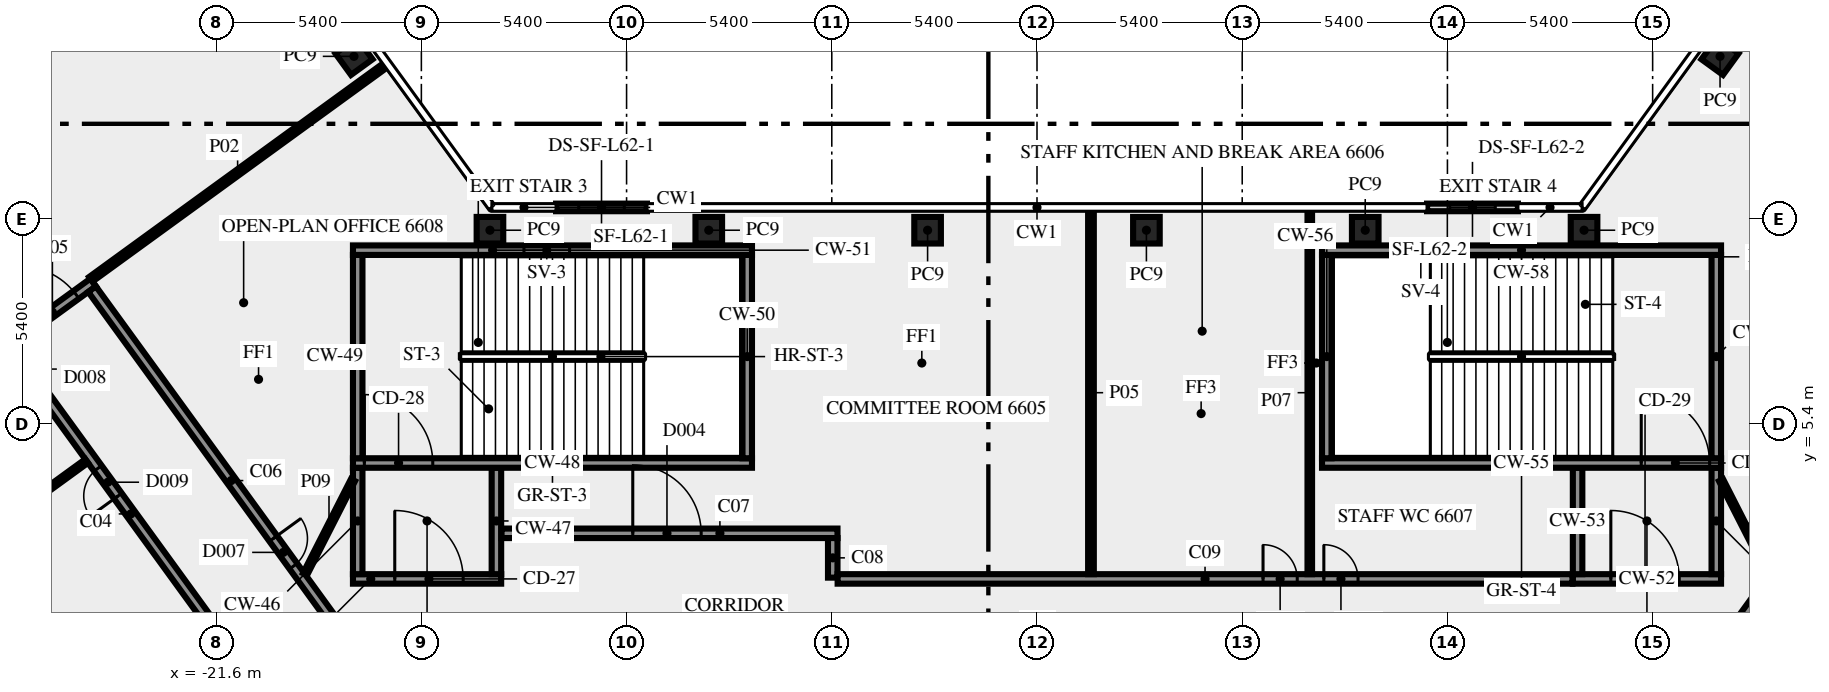
"""IFC4 building model, lengths in metres.
Left out: names, types, materials, properties, quantities, classifications, styles, units other than length and angle.
Written with IfcOpenShell. Run it as: python <this file> out.ifc"""

import sys

from ifc_helpers import new_model, si_unit, direction, frame, frame_2d, origin, origin_2d, place, context, subcontext, project, spatial, rectangle, extrude, element, fill, save


model = new_model("IFC4")
c1 = context("Model", 3, precision=1e-05, world=origin(), true_north=direction((0.0, 1.0)))
c2 = subcontext(c1, "Body", "Model", "MODEL_VIEW")
j1 = project(units=[si_unit("LENGTHUNIT", "METRE"), si_unit("PLANEANGLEUNIT", "RADIAN")], contexts=[c1])
p1 = place(None, origin())
s1 = spatial("IfcSite", under=j1, at=p1, CompositionType="ELEMENT")
p2 = place(p1, origin())
s2 = spatial("IfcBuilding", under=s1, at=p2, CompositionType="ELEMENT")
p3 = place(p2, frame((0.0, 0.0, 285.0)))
s3 = spatial("IfcBuildingStorey", under=s2, at=p3, CompositionType="ELEMENT", Elevation=285.0)
for number, where, z_axis, x_axis in (
    (1, (-17.974, 15.075, 0.0), (0.0, 0.0, 1.0), (-0.588, 0.809, 0.0)),
    (2, (17.974, 15.075, 0.0), (0.0, 0.0, 1.0), (-0.588, -0.809, 0.0)),
    (3, (14.395, 10.5, 0.0), (0.0, 0.0, 1.0), (-1.0, 0.0, 0.0)),
    (4, (8.637, 10.5, 0.0), (0.0, 0.0, 1.0), (-1.0, 0.0, 0.0)),
    (5, (2.879, 10.5, 0.0), (0.0, 0.0, 1.0), (-1.0, 0.0, 0.0)),
    (6, (-2.879, 10.5, 0.0), (0.0, 0.0, 1.0), (-1.0, 0.0, 0.0)),
    (7, (-8.637, 10.5, 0.0), (0.0, 0.0, 1.0), (-1.0, 0.0, 0.0)),
    (8, (-14.395, 10.5, 0.0), (0.0, 0.0, 1.0), (-1.0, 0.0, 0.0)),
):
    element("IfcColumn", number, at=place(p3, frame(where, z_axis=z_axis, x_axis=x_axis)), inside=s3, PredefinedType="COLUMN", context=c2, shape_type="SweptSolid", body=[
        extrude(rectangle(XDim=0.7, YDim=0.7, at=origin_2d()), origin(), (0.0, 0.0, 1.0), 3.65),
    ])
p4 = place(p3, frame((12.655, 11.1, 0.0), z_axis=(0.0, 0.0, 1.0), x_axis=(-1.0, 0.0, 0.0)))
e9 = element("IfcWall", 9, at=p4, inside=s3, PredefinedType="SOLIDWALL", context=c2, shape_type="SweptSolid", body=[
    extrude(rectangle(XDim=2.392, YDim=0.2, at=frame_2d((1.196, 0.0))), origin(), (0.0, 0.0, 1.0), 3.65),
])
p5 = place(p4, frame((0.596, 0.0, 1.0)))
e10 = element("IfcOpeningElement", 10, at=p5, cuts=e9, PredefinedType="OPENING", context=c2, shape_type="SweptSolid", body=[
    extrude(rectangle(XDim=1.2, YDim=1.2, at=frame_2d((0.6, 0.6))), frame((0.0, 0.11, 0.0), z_axis=(0.0, -1.0, 0.0), x_axis=(1.0, 0.0, 0.0)), (0.0, 0.0, 1.0), 0.22),
])
p6 = place(p3, frame((-10.263, 11.1, 0.0), z_axis=(0.0, 0.0, 1.0), x_axis=(-1.0, 0.0, 0.0)))
e11 = element("IfcWall", 11, at=p6, inside=s3, PredefinedType="SOLIDWALL", context=c2, shape_type="SweptSolid", body=[
    extrude(rectangle(XDim=2.392, YDim=0.2, at=frame_2d((1.196, 0.0))), origin(), (0.0, 0.0, 1.0), 3.65),
])
p7 = place(p6, frame((0.596, 0.0, 1.0)))
e12 = element("IfcOpeningElement", 12, at=p7, cuts=e11, PredefinedType="OPENING", context=c2, shape_type="SweptSolid", body=[
    extrude(rectangle(XDim=1.2, YDim=1.2, at=frame_2d((0.6, 0.6))), frame((0.0, 0.11, 0.0), z_axis=(0.0, -1.0, 0.0), x_axis=(1.0, 0.0, 0.0)), (0.0, 0.0, 1.0), 0.22),
])
p8 = place(p3, frame((-18.0, 1.325, 0.0), z_axis=(0.0, 0.0, 1.0), x_axis=(1.0, 0.0, 0.0)))
e13 = element("IfcWall", 13, at=p8, inside=s3, PredefinedType="SHEAR", context=c2, shape_type="SweptSolid", body=[
    extrude(rectangle(XDim=3.9, YDim=0.25, at=frame_2d((1.95, 0.0))), origin(), (0.0, 0.0, 1.0), 3.65),
])
p9 = place(p8, frame((1.1, 0.0, 0.0)))
e14 = element("IfcOpeningElement", 14, at=p9, cuts=e13, PredefinedType="OPENING", context=c2, shape_type="SweptSolid", body=[
    extrude(rectangle(XDim=1.8, YDim=2.1, at=frame_2d((0.9, 1.05))), frame((0.0, 0.135, 0.0), z_axis=(0.0, -1.0, 0.0), x_axis=(1.0, 0.0, 0.0)), (0.0, 0.0, 1.0), 0.27),
])
for number, where, z_axis, x_axis in (
    (15, (-17.875, 1.45, 0.0), (0.0, 0.0, 1.0), (0.0, 1.0, 0.0)),
    (16, (-14.225, 1.45, 0.0), (0.0, 0.0, 1.0), (0.0, 1.0, 0.0)),
):
    element("IfcWall", number, at=place(p3, frame(where, z_axis=z_axis, x_axis=x_axis)), inside=s3, PredefinedType="SHEAR", context=c2, shape_type="SweptSolid", body=[
        extrude(rectangle(XDim=2.8, YDim=0.25, at=frame_2d((1.4, 0.0))), origin(), (0.0, 0.0, 1.0), 3.65),
    ])
p10 = place(p3, frame((-18.0, 4.375, 0.0), z_axis=(0.0, 0.0, 1.0), x_axis=(1.0, 0.0, 0.0)))
e17 = element("IfcWall", 17, at=p10, inside=s3, PredefinedType="SHEAR", context=c2, shape_type="SweptSolid", body=[
    extrude(rectangle(XDim=10.5, YDim=0.25, at=frame_2d((5.25, 0.0))), origin(), (0.0, 0.0, 1.0), 3.65),
])
p11 = place(p10, frame((0.3, 0.0, 0.0)))
e18 = element("IfcOpeningElement", 18, at=p11, cuts=e17, PredefinedType="OPENING", context=c2, shape_type="SweptSolid", body=[
    extrude(rectangle(XDim=1.8, YDim=2.1, at=frame_2d((0.9, 1.05))), frame((0.0, 0.135, 0.0), z_axis=(0.0, -1.0, 0.0), x_axis=(1.0, 0.0, 0.0)), (0.0, 0.0, 1.0), 0.27),
])
for number, where, z_axis, x_axis in (
    (19, (-17.875, 4.5, 0.0), (0.0, 0.0, 1.0), (0.0, 1.0, 0.0)),
    (20, (-7.625, 4.5, 0.0), (0.0, 0.0, 1.0), (0.0, 1.0, 0.0)),
):
    element("IfcWall", number, at=place(p3, frame(where, z_axis=z_axis, x_axis=x_axis)), inside=s3, PredefinedType="SHEAR", context=c2, shape_type="SweptSolid", body=[
        extrude(rectangle(XDim=5.35, YDim=0.25, at=frame_2d((2.675, 0.0))), origin(), (0.0, 0.0, 1.0), 3.65),
    ])
p12 = place(p3, frame((-18.0, 9.975, 0.0), z_axis=(0.0, 0.0, 1.0), x_axis=(1.0, 0.0, 0.0)))
e21 = element("IfcWall", 21, at=p12, inside=s3, PredefinedType="SHEAR", context=c2, shape_type="SweptSolid", body=[
    extrude(rectangle(XDim=10.5, YDim=0.25, at=frame_2d((5.25, 0.0))), origin(), (0.0, 0.0, 1.0), 3.65),
])
p13 = place(p12, frame((4.5, 0.0, 1.0)))
e22 = element("IfcOpeningElement", 22, at=p13, cuts=e21, PredefinedType="OPENING", context=c2, shape_type="SweptSolid", body=[
    extrude(rectangle(XDim=1.2, YDim=1.2, at=frame_2d((0.6, 0.6))), frame((0.0, 0.135, 0.0), z_axis=(0.0, -1.0, 0.0), x_axis=(1.0, 0.0, 0.0)), (0.0, 0.0, 1.0), 0.27),
])
p14 = place(p3, frame((14.1, 1.325, 0.0), z_axis=(0.0, 0.0, 1.0), x_axis=(1.0, 0.0, 0.0)))
e23 = element("IfcWall", 23, at=p14, inside=s3, PredefinedType="SHEAR", context=c2, shape_type="SweptSolid", body=[
    extrude(rectangle(XDim=3.9, YDim=0.25, at=frame_2d((1.95, 0.0))), origin(), (0.0, 0.0, 1.0), 3.65),
])
p15 = place(p14, frame((1.0, 0.0, 0.0)))
e24 = element("IfcOpeningElement", 24, at=p15, cuts=e23, PredefinedType="OPENING", context=c2, shape_type="SweptSolid", body=[
    extrude(rectangle(XDim=1.8, YDim=2.1, at=frame_2d((0.9, 1.05))), frame((0.0, 0.135, 0.0), z_axis=(0.0, -1.0, 0.0), x_axis=(1.0, 0.0, 0.0)), (0.0, 0.0, 1.0), 0.27),
])
for number, where, z_axis, x_axis in (
    (25, (14.225, 1.45, 0.0), (0.0, 0.0, 1.0), (0.0, 1.0, 0.0)),
    (26, (17.875, 1.45, 0.0), (0.0, 0.0, 1.0), (0.0, 1.0, 0.0)),
):
    element("IfcWall", number, at=place(p3, frame(where, z_axis=z_axis, x_axis=x_axis)), inside=s3, PredefinedType="SHEAR", context=c2, shape_type="SweptSolid", body=[
        extrude(rectangle(XDim=2.8, YDim=0.25, at=frame_2d((1.4, 0.0))), origin(), (0.0, 0.0, 1.0), 3.65),
    ])
p16 = place(p3, frame((7.5, 4.375, 0.0), z_axis=(0.0, 0.0, 1.0), x_axis=(1.0, 0.0, 0.0)))
e27 = element("IfcWall", 27, at=p16, inside=s3, PredefinedType="SHEAR", context=c2, shape_type="SweptSolid", body=[
    extrude(rectangle(XDim=10.5, YDim=0.25, at=frame_2d((5.25, 0.0))), origin(), (0.0, 0.0, 1.0), 3.65),
])
p17 = place(p16, frame((8.4, 0.0, 0.0)))
e28 = element("IfcOpeningElement", 28, at=p17, cuts=e27, PredefinedType="OPENING", context=c2, shape_type="SweptSolid", body=[
    extrude(rectangle(XDim=1.8, YDim=2.1, at=frame_2d((0.9, 1.05))), frame((0.0, 0.135, 0.0), z_axis=(0.0, -1.0, 0.0), x_axis=(1.0, 0.0, 0.0)), (0.0, 0.0, 1.0), 0.27),
])
for number, where, z_axis, x_axis in (
    (29, (7.625, 4.5, 0.0), (0.0, 0.0, 1.0), (0.0, 1.0, 0.0)),
    (30, (17.875, 4.5, 0.0), (0.0, 0.0, 1.0), (0.0, 1.0, 0.0)),
):
    element("IfcWall", number, at=place(p3, frame(where, z_axis=z_axis, x_axis=x_axis)), inside=s3, PredefinedType="SHEAR", context=c2, shape_type="SweptSolid", body=[
        extrude(rectangle(XDim=5.35, YDim=0.25, at=frame_2d((2.675, 0.0))), origin(), (0.0, 0.0, 1.0), 3.65),
    ])
p18 = place(p3, frame((7.5, 9.975, 0.0), z_axis=(0.0, 0.0, 1.0), x_axis=(1.0, 0.0, 0.0)))
e31 = element("IfcWall", 31, at=p18, inside=s3, PredefinedType="SHEAR", context=c2, shape_type="SweptSolid", body=[
    extrude(rectangle(XDim=10.5, YDim=0.25, at=frame_2d((5.25, 0.0))), origin(), (0.0, 0.0, 1.0), 3.65),
])
p19 = place(p18, frame((2.0, 0.0, 1.0)))
e32 = element("IfcOpeningElement", 32, at=p19, cuts=e31, PredefinedType="OPENING", context=c2, shape_type="SweptSolid", body=[
    extrude(rectangle(XDim=1.2, YDim=1.2, at=frame_2d((0.6, 0.6))), frame((0.0, 0.135, 0.0), z_axis=(0.0, -1.0, 0.0), x_axis=(1.0, 0.0, 0.0)), (0.0, 0.0, 1.0), 0.27),
])
p20 = place(p3, frame((17.545, -1.125, 0.0), z_axis=(0.0, 0.0, 1.0), x_axis=(0.58779555165, 0.809009511354, 0.0)))
e33 = element("IfcWall", 33, at=p20, inside=s3, PredefinedType="SOLIDWALL", context=c2, shape_type="SweptSolid", body=[
    extrude(rectangle(XDim=18.103, YDim=0.25, at=frame_2d((9.052, 0.0))), origin(), (0.0, 0.0, 1.0), 3.65),
])
p21 = place(p20, frame((3.441, 0.0, 0.0)))
e34 = element("IfcOpeningElement", 34, at=p21, cuts=e33, PredefinedType="OPENING", context=c2, shape_type="SweptSolid", body=[
    extrude(rectangle(XDim=0.9, YDim=2.1, at=frame_2d((0.45, 1.05))), frame((0.0, 0.135, 0.0), z_axis=(0.0, -1.0, 0.0), x_axis=(1.0, 0.0, 0.0)), (0.0, 0.0, 1.0), 0.27),
])
p22 = place(p3, frame((-20.531, -1.523, 0.0), z_axis=(0.0, 0.0, 1.0), x_axis=(-0.587782646447, 0.809018887626, 0.0)))
e35 = element("IfcWall", 35, at=p22, inside=s3, PredefinedType="SOLIDWALL", context=c2, shape_type="SweptSolid", body=[
    extrude(rectangle(XDim=11.27, YDim=0.25, at=frame_2d((5.635, 0.0))), origin(), (0.0, 0.0, 1.0), 3.65),
])
p23 = place(p22, frame((6.216, 0.0, 0.0)))
e36 = element("IfcOpeningElement", 36, at=p23, cuts=e35, PredefinedType="OPENING", context=c2, shape_type="SweptSolid", body=[
    extrude(rectangle(XDim=0.9, YDim=2.1, at=frame_2d((0.45, 1.05))), frame((0.0, 0.135, 0.0), z_axis=(0.0, -1.0, 0.0), x_axis=(1.0, 0.0, 0.0)), (0.0, 0.0, 1.0), 0.27),
])
p24 = place(p22, frame((9.896, 0.0, 0.0)))
e37 = element("IfcOpeningElement", 37, at=p24, cuts=e35, PredefinedType="OPENING", context=c2, shape_type="SweptSolid", body=[
    extrude(rectangle(XDim=0.9, YDim=2.1, at=frame_2d((0.45, 1.05))), frame((0.0, 0.135, 0.0), z_axis=(0.0, -1.0, 0.0), x_axis=(1.0, 0.0, 0.0)), (0.0, 0.0, 1.0), 0.27),
])
p25 = place(p3, frame((-26.981, 7.567, 0.0), z_axis=(0.0, 0.0, 1.0), x_axis=(0.809038743598, 0.587755315891, 0.0)))
e38 = element("IfcWall", 38, at=p25, inside=s3, PredefinedType="SOLIDWALL", context=c2, shape_type="SweptSolid", body=[
    extrude(rectangle(XDim=2.65, YDim=0.25, at=frame_2d((1.325, 0.0))), origin(), (0.0, 0.0, 1.0), 3.65),
])
p26 = place(p25, frame((0.3, 0.0, 0.0)))
e39 = element("IfcOpeningElement", 39, at=p26, cuts=e38, PredefinedType="OPENING", context=c2, shape_type="SweptSolid", body=[
    extrude(rectangle(XDim=1.8, YDim=2.1, at=frame_2d((0.9, 1.05))), frame((0.0, 0.135, 0.0), z_axis=(0.0, -1.0, 0.0), x_axis=(1.0, 0.0, 0.0)), (0.0, 0.0, 1.0), 0.27),
])
p27 = place(p3, frame((-24.865, 8.95, 0.0), z_axis=(0.0, 0.0, 1.0), x_axis=(0.587791617212, -0.809012369952, 0.0)))
e40 = element("IfcWall", 40, at=p27, inside=s3, PredefinedType="SOLIDWALL", context=c2, shape_type="SweptSolid", body=[
    extrude(rectangle(XDim=12.453, YDim=0.25, at=frame_2d((6.227, 0.0))), origin(), (0.0, 0.0, 1.0), 3.65),
])
p28 = place(p27, frame((8.112, 0.0, 0.0)))
e41 = element("IfcOpeningElement", 41, at=p28, cuts=e40, PredefinedType="OPENING", context=c2, shape_type="SweptSolid", body=[
    extrude(rectangle(XDim=0.9, YDim=2.1, at=frame_2d((0.45, 1.05))), frame((0.0, 0.135, 0.0), z_axis=(0.0, -1.0, 0.0), x_axis=(1.0, 0.0, 0.0)), (0.0, 0.0, 1.0), 0.27),
])
p29 = place(p3, frame((-14.09, 2.525, 0.0), z_axis=(0.0, 0.0, 1.0), x_axis=(1.0, 0.0, 0.0)))
e42 = element("IfcWall", 42, at=p29, inside=s3, PredefinedType="SOLIDWALL", context=c2, shape_type="SweptSolid", body=[
    extrude(rectangle(XDim=8.84, YDim=0.25, at=frame_2d((4.42, 0.0))), origin(), (0.0, 0.0, 1.0), 3.65),
])
p30 = place(p29, frame((3.453, 0.0, 0.0)))
e43 = element("IfcOpeningElement", 43, at=p30, cuts=e42, PredefinedType="OPENING", context=c2, shape_type="SweptSolid", body=[
    extrude(rectangle(XDim=1.8, YDim=2.1, at=frame_2d((0.9, 1.05))), frame((0.0, 0.135, 0.0), z_axis=(0.0, -1.0, 0.0), x_axis=(1.0, 0.0, 0.0)), (0.0, 0.0, 1.0), 0.27),
])
p31 = place(p3, frame((-5.375, 2.4, 0.0), z_axis=(0.0, 0.0, 1.0), x_axis=(0.0, -1.0, 0.0)))
e44 = element("IfcWall", 44, at=p31, inside=s3, PredefinedType="SOLIDWALL", context=c2, shape_type="SweptSolid", body=[
    extrude(rectangle(XDim=1.041, YDim=0.25, at=frame_2d((0.521, 0.0))), origin(), (0.0, 0.0, 1.0), 3.65),
])
p32 = place(p3, frame((-5.246, 1.325, 0.0), z_axis=(0.0, 0.0, 1.0), x_axis=(1.0, 0.0, 0.0)))
e45 = element("IfcWall", 45, at=p32, inside=s3, PredefinedType="SOLIDWALL", context=c2, shape_type="SweptSolid", body=[
    extrude(rectangle(XDim=19.336, YDim=0.25, at=frame_2d((9.668, 0.0))), origin(), (0.0, 0.0, 1.0), 3.65),
])
p33 = place(p32, frame((11.194, 0.0, 0.0)))
e46 = element("IfcOpeningElement", 46, at=p33, cuts=e45, PredefinedType="OPENING", context=c2, shape_type="SweptSolid", body=[
    extrude(rectangle(XDim=0.9, YDim=2.1, at=frame_2d((0.45, 1.05))), frame((0.0, 0.135, 0.0), z_axis=(0.0, -1.0, 0.0), x_axis=(1.0, 0.0, 0.0)), (0.0, 0.0, 1.0), 0.27),
])
p34 = place(p32, frame((12.794, 0.0, 0.0)))
e47 = element("IfcOpeningElement", 47, at=p34, cuts=e45, PredefinedType="OPENING", context=c2, shape_type="SweptSolid", body=[
    extrude(rectangle(XDim=0.9, YDim=2.1, at=frame_2d((0.45, 1.05))), frame((0.0, 0.135, 0.0), z_axis=(0.0, -1.0, 0.0), x_axis=(1.0, 0.0, 0.0)), (0.0, 0.0, 1.0), 0.27),
])
p35 = place(p3, frame((-17.172, 14.823, 0.0), z_axis=(0.0, 0.0, 1.0), x_axis=(-0.809013490065, -0.587790075531, 0.0)))
e48 = element("IfcWall", 48, at=p35, inside=s3, PredefinedType="PARTITIONING", context=c2, shape_type="SweptSolid", body=[
    extrude(rectangle(XDim=9.549, YDim=0.15, at=frame_2d((4.775, 0.0))), origin(), (0.0, 0.0, 1.0), 2.95),
])
p36 = place(p3, frame((-25.008, 4.427, 0.0), z_axis=(0.0, 0.0, 1.0), x_axis=(-0.808994684961, -0.587815957341, 0.0)))
e49 = element("IfcWall", 49, at=p36, inside=s3, PredefinedType="PARTITIONING", context=c2, shape_type="SweptSolid", body=[
    extrude(rectangle(XDim=9.55, YDim=0.12, at=frame_2d((4.775, 0.0))), origin(), (0.0, 0.0, 1.0), 2.95),
])
p37 = place(p3, frame((1.42, 1.45, 0.0), z_axis=(0.0, 0.0, 1.0), x_axis=(0.0, 1.0, 0.0)))
e50 = element("IfcWall", 50, at=p37, inside=s3, PredefinedType="PARTITIONING", context=c2, shape_type="SweptSolid", body=[
    extrude(rectangle(XDim=9.55, YDim=0.15, at=frame_2d((4.775, 0.0))), origin(), (0.0, 0.0, 1.0), 2.95),
])
p38 = place(p3, frame((7.178, 1.45, 0.0), z_axis=(0.0, 0.0, 1.0), x_axis=(0.0, 1.0, 0.0)))
e51 = element("IfcWall", 51, at=p38, inside=s3, PredefinedType="PARTITIONING", context=c2, shape_type="SweptSolid", body=[
    extrude(rectangle(XDim=9.55, YDim=0.12, at=frame_2d((4.775, 0.0))), origin(), (0.0, 0.0, 1.0), 2.95),
])
for number, where, z_axis, x_axis in (
    (52, (18.0, 3.925, 0.0), (0.0, 0.0, 1.0), (0.454, -0.891, 0.0)),
    (53, (-19.261, 1.45, 0.0), (0.0, 0.0, 1.0), (0.454, 0.891, 0.0)),
):
    element("IfcWall", number, at=place(p3, frame(where, z_axis=z_axis, x_axis=x_axis)), inside=s3, PredefinedType="PARTITIONING", context=c2, shape_type="SweptSolid", body=[
        extrude(rectangle(XDim=2.778, YDim=0.12, at=frame_2d((1.389, 0.0))), origin(), (0.0, 0.0, 1.0), 3.65),
    ])
p39 = place(p5, origin())
e54 = element("IfcWindow", 54, at=p39, inside=s3, PartitioningType="SINGLE_PANEL", PredefinedType="WINDOW", context=c2, shape_type="SweptSolid", body=[
    extrude(rectangle(XDim=1.2, YDim=1.2, at=frame_2d((0.6, 0.6))), frame((0.0, 0.03, 0.0), z_axis=(0.0, -1.0, 0.0), x_axis=(1.0, 0.0, 0.0)), (0.0, 0.0, 1.0), 0.06),
])
fill(e10, e54)
p40 = place(p7, origin())
e55 = element("IfcWindow", 55, at=p40, inside=s3, PartitioningType="SINGLE_PANEL", PredefinedType="WINDOW", context=c2, shape_type="SweptSolid", body=[
    extrude(rectangle(XDim=1.2, YDim=1.2, at=frame_2d((0.6, 0.6))), frame((0.0, 0.03, 0.0), z_axis=(0.0, -1.0, 0.0), x_axis=(1.0, 0.0, 0.0)), (0.0, 0.0, 1.0), 0.06),
])
fill(e12, e55)
p41 = place(p9, origin())
e56 = element("IfcDoor", 56, at=p41, inside=s3, OperationType="DOUBLE_DOOR_SINGLE_SWING", PredefinedType="DOOR", context=c2, shape_type="SweptSolid", body=[
    extrude(rectangle(XDim=1.8, YDim=2.1, at=frame_2d((0.9, 1.05))), frame((0.0, 0.025, 0.0), z_axis=(0.0, -1.0, 0.0), x_axis=(1.0, 0.0, 0.0)), (0.0, 0.0, 1.0), 0.05),
])
fill(e14, e56)
p42 = place(p11, origin())
e57 = element("IfcDoor", 57, at=p42, inside=s3, OperationType="DOUBLE_DOOR_SINGLE_SWING", PredefinedType="DOOR", context=c2, shape_type="SweptSolid", body=[
    extrude(rectangle(XDim=1.8, YDim=2.1, at=frame_2d((0.9, 1.05))), frame((0.0, 0.025, 0.0), z_axis=(0.0, -1.0, 0.0), x_axis=(1.0, 0.0, 0.0)), (0.0, 0.0, 1.0), 0.05),
])
fill(e18, e57)
p43 = place(p13, origin())
e58 = element("IfcWindow", 58, at=p43, inside=s3, PartitioningType="SINGLE_PANEL", PredefinedType="WINDOW", context=c2, shape_type="SweptSolid", body=[
    extrude(rectangle(XDim=1.2, YDim=1.2, at=frame_2d((0.6, 0.6))), frame((0.0, 0.03, 0.0), z_axis=(0.0, -1.0, 0.0), x_axis=(1.0, 0.0, 0.0)), (0.0, 0.0, 1.0), 0.06),
])
fill(e22, e58)
p44 = place(p15, origin())
e59 = element("IfcDoor", 59, at=p44, inside=s3, OperationType="DOUBLE_DOOR_SINGLE_SWING", PredefinedType="DOOR", context=c2, shape_type="SweptSolid", body=[
    extrude(rectangle(XDim=1.8, YDim=2.1, at=frame_2d((0.9, 1.05))), frame((0.0, 0.025, 0.0), z_axis=(0.0, -1.0, 0.0), x_axis=(1.0, 0.0, 0.0)), (0.0, 0.0, 1.0), 0.05),
])
fill(e24, e59)
p45 = place(p17, origin())
e60 = element("IfcDoor", 60, at=p45, inside=s3, OperationType="DOUBLE_DOOR_SINGLE_SWING", PredefinedType="DOOR", context=c2, shape_type="SweptSolid", body=[
    extrude(rectangle(XDim=1.8, YDim=2.1, at=frame_2d((0.9, 1.05))), frame((0.0, 0.025, 0.0), z_axis=(0.0, -1.0, 0.0), x_axis=(1.0, 0.0, 0.0)), (0.0, 0.0, 1.0), 0.05),
])
fill(e28, e60)
p46 = place(p19, origin())
e61 = element("IfcWindow", 61, at=p46, inside=s3, PartitioningType="SINGLE_PANEL", PredefinedType="WINDOW", context=c2, shape_type="SweptSolid", body=[
    extrude(rectangle(XDim=1.2, YDim=1.2, at=frame_2d((0.6, 0.6))), frame((0.0, 0.03, 0.0), z_axis=(0.0, -1.0, 0.0), x_axis=(1.0, 0.0, 0.0)), (0.0, 0.0, 1.0), 0.06),
])
fill(e32, e61)
p47 = place(p28, origin())
e62 = element("IfcDoor", 62, at=p47, inside=s3, OperationType="SINGLE_SWING_RIGHT", PredefinedType="DOOR", context=c2, shape_type="SweptSolid", body=[
    extrude(rectangle(XDim=0.9, YDim=2.1, at=frame_2d((0.45, 1.05))), frame((0.0, 0.025, 0.0), z_axis=(0.0, -1.0, 0.0), x_axis=(1.0, 0.0, 0.0)), (0.0, 0.0, 1.0), 0.05),
])
fill(e41, e62)
p48 = place(p23, origin())
e63 = element("IfcDoor", 63, at=p48, inside=s3, OperationType="SINGLE_SWING_RIGHT", PredefinedType="DOOR", context=c2, shape_type="SweptSolid", body=[
    extrude(rectangle(XDim=0.9, YDim=2.1, at=frame_2d((0.45, 1.05))), frame((0.0, 0.025, 0.0), z_axis=(0.0, -1.0, 0.0), x_axis=(1.0, 0.0, 0.0)), (0.0, 0.0, 1.0), 0.05),
])
fill(e36, e63)
p49 = place(p30, origin())
e64 = element("IfcDoor", 64, at=p49, inside=s3, OperationType="DOUBLE_DOOR_SINGLE_SWING", PredefinedType="DOOR", context=c2, shape_type="SweptSolid", body=[
    extrude(rectangle(XDim=1.8, YDim=2.1, at=frame_2d((0.9, 1.05))), frame((0.0, 0.025, 0.0), z_axis=(0.0, -1.0, 0.0), x_axis=(1.0, 0.0, 0.0)), (0.0, 0.0, 1.0), 0.05),
])
fill(e43, e64)
p50 = place(p26, origin())
e65 = element("IfcDoor", 65, at=p50, inside=s3, OperationType="DOUBLE_DOOR_SINGLE_SWING", PredefinedType="DOOR", context=c2, shape_type="SweptSolid", body=[
    extrude(rectangle(XDim=1.8, YDim=2.1, at=frame_2d((0.9, 1.05))), frame((0.0, 0.025, 0.0), z_axis=(0.0, -1.0, 0.0), x_axis=(1.0, 0.0, 0.0)), (0.0, 0.0, 1.0), 0.05),
])
fill(e39, e65)
p51 = place(p33, origin())
e66 = element("IfcDoor", 66, at=p51, inside=s3, OperationType="SINGLE_SWING_RIGHT", PredefinedType="DOOR", context=c2, shape_type="SweptSolid", body=[
    extrude(rectangle(XDim=0.9, YDim=2.1, at=frame_2d((0.45, 1.05))), frame((0.0, 0.025, 0.0), z_axis=(0.0, -1.0, 0.0), x_axis=(1.0, 0.0, 0.0)), (0.0, 0.0, 1.0), 0.05),
])
fill(e46, e66)
p52 = place(p34, origin())
e67 = element("IfcDoor", 67, at=p52, inside=s3, OperationType="SINGLE_SWING_LEFT", PredefinedType="DOOR", context=c2, shape_type="SweptSolid", body=[
    extrude(rectangle(XDim=0.9, YDim=2.1, at=frame_2d((0.45, 1.05))), frame((0.0, 0.025, 0.0), z_axis=(0.0, -1.0, 0.0), x_axis=(1.0, 0.0, 0.0)), (0.0, 0.0, 1.0), 0.05),
])
fill(e47, e67)
save(model, sys.argv[1])
